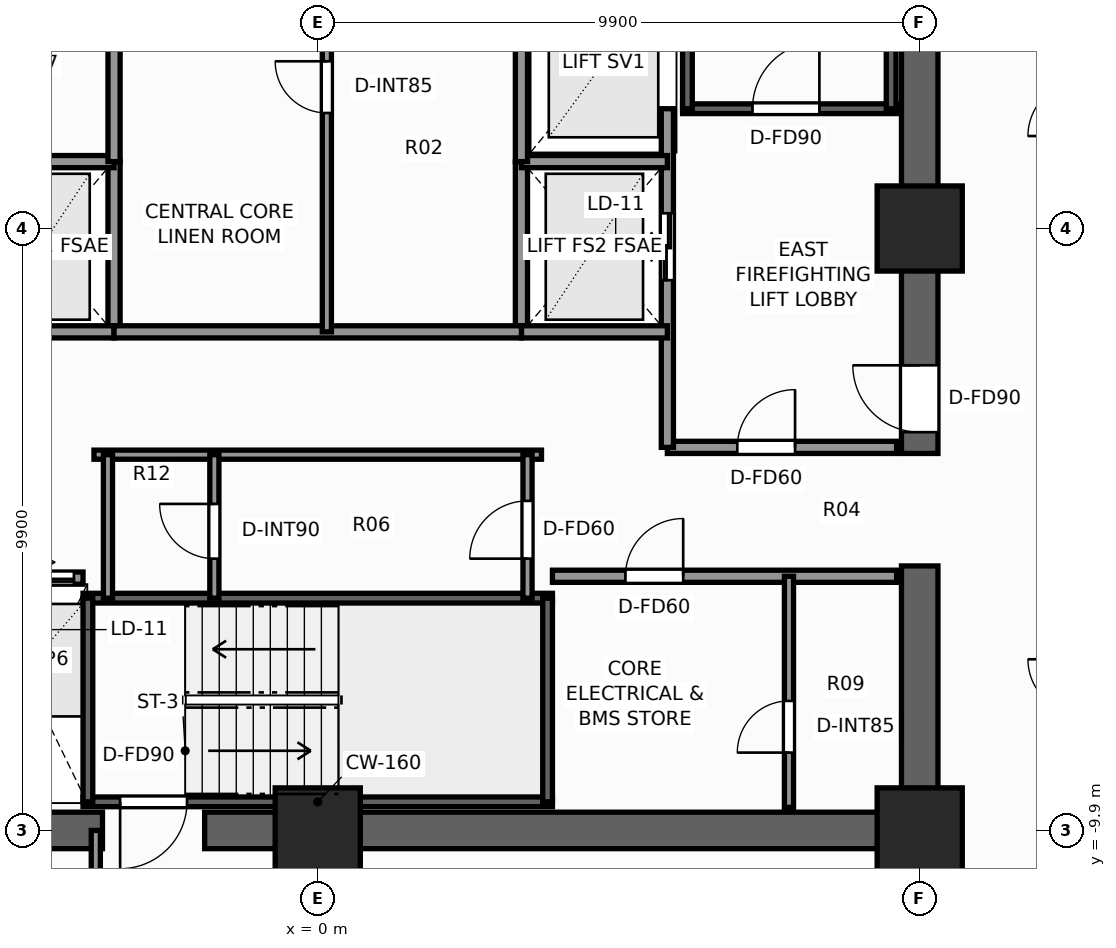
"""IFC4 building model, lengths in metres.
Left out: names, types, materials, properties, quantities, classifications, styles, units other than length and angle.
Written with IfcOpenShell. Run it as: python <this file> out.ifc"""

import sys

from ifc_helpers import new_model, si_unit, direction, frame, frame_2d, origin, origin_2d, place, context, subcontext, project, spatial, rectangle, extrude, element, fill, save


model = new_model("IFC4")
c1 = context("Model", 3, precision=1e-05, world=origin(), true_north=direction((0.0, 1.0)))
c2 = subcontext(c1, "Body", "Model", "MODEL_VIEW")
j1 = project(units=[si_unit("LENGTHUNIT", "METRE"), si_unit("PLANEANGLEUNIT", "RADIAN")], contexts=[c1])
p1 = place(None, origin())
s1 = spatial("IfcSite", under=j1, at=p1, CompositionType="ELEMENT")
p2 = place(p1, origin())
s2 = spatial("IfcBuilding", under=s1, at=p2, CompositionType="ELEMENT")
p3 = place(p2, frame((0.0, 0.0, 72.2)))
s3 = spatial("IfcBuildingStorey", under=s2, at=p3, CompositionType="ELEMENT", Elevation=72.2)
p4 = place(p3, frame((10.2, -9.9, 0.0), z_axis=(0.0, 0.0, 1.0), x_axis=(-1.0, 0.0, 0.0)))
e1 = element("IfcWall", 1, at=p4, inside=s3, PredefinedType="SHEAR", context=c2, shape_type="SweptSolid", body=[
    extrude(rectangle(XDim=12.06, YDim=0.6, at=frame_2d((6.03, 0.0))), origin(), (0.0, 0.0, 1.0), 3.3),
])
p5 = place(p3, frame((-3.54, -9.9, 0.0), z_axis=(0.0, 0.0, 1.0), x_axis=(-1.0, 0.0, 0.0)))
e2 = element("IfcWall", 2, at=p5, inside=s3, PredefinedType="SHEAR", context=c2, shape_type="SweptSolid", body=[
    extrude(rectangle(XDim=6.66, YDim=0.6, at=frame_2d((3.33, 0.0))), origin(), (0.0, 0.0, 1.0), 3.3),
])
p6 = place(p3, frame((9.9, -9.6, 0.0), z_axis=(0.0, 0.0, 1.0), x_axis=(0.0, 1.0, 0.0)))
e3 = element("IfcWall", 3, at=p6, inside=s3, PredefinedType="SHEAR", context=c2, shape_type="SweptSolid", body=[
    extrude(rectangle(XDim=4.05, YDim=0.6, at=frame_2d((2.025, 0.0))), origin(), (0.0, 0.0, 1.0), 3.3),
])
p7 = place(p3, frame((9.9, -3.7, 0.0), z_axis=(0.0, 0.0, 1.0), x_axis=(0.0, 1.0, 0.0)))
e4 = element("IfcWall", 4, at=p7, inside=s3, PredefinedType="SHEAR", context=c2, shape_type="SweptSolid", body=[
    extrude(rectangle(XDim=13.3, YDim=0.6, at=frame_2d((6.65, 0.0))), origin(), (0.0, 0.0, 1.0), 3.3),
])
p8 = place(p7, frame((0.35, 0.0, 0.0)))
e5 = element("IfcOpeningElement", 5, at=p8, cuts=e4, PredefinedType="OPENING", context=c2, shape_type="SweptSolid", body=[
    extrude(rectangle(XDim=1.1, YDim=2.2, at=frame_2d((0.55, 1.1))), frame((0.0, 0.31, 0.0), z_axis=(0.0, -1.0, 0.0), x_axis=(1.0, 0.0, 0.0)), (0.0, 0.0, 1.0), 0.62),
])
for number, where, z_axis, x_axis in (
    (6, (9.9, -9.9, 0.0), (0.0, 0.0, 1.0), (1.0, 0.0, 0.0)),
    (7, (0.0, -9.9, 0.0), (0.0, 0.0, 1.0), (1.0, 0.0, 0.0)),
    (8, (9.9, 0.0, 0.0), (0.0, 0.0, 1.0), (1.0, 0.0, 0.0)),
):
    element("IfcColumn", number, at=place(p3, frame(where, z_axis=z_axis, x_axis=x_axis)), inside=s3, PredefinedType="COLUMN", context=c2, shape_type="SweptSolid", body=[
        extrude(rectangle(XDim=1.4, YDim=1.4, at=origin_2d()), origin(), (0.0, 0.0, 1.0), 3.3),
    ])
p9 = place(p3, frame((6.0, 1.97, 0.0), z_axis=(0.0, 0.0, 1.0), x_axis=(1.0, 0.0, 0.0)))
e9 = element("IfcWall", 9, at=p9, inside=s3, PredefinedType="SHEAR", context=c2, shape_type="SweptSolid", body=[
    extrude(rectangle(XDim=3.52, YDim=0.16, at=frame_2d((1.76, 0.0))), origin(), (0.0, 0.0, 1.0), 3.3),
])
p10 = place(p9, frame((1.15, 0.0, 0.0)))
e10 = element("IfcOpeningElement", 10, at=p10, cuts=e9, PredefinedType="OPENING", context=c2, shape_type="SweptSolid", body=[
    extrude(rectangle(XDim=1.1, YDim=2.2, at=frame_2d((0.55, 1.1))), frame((0.0, 0.09, 0.0), z_axis=(0.0, -1.0, 0.0), x_axis=(1.0, 0.0, 0.0)), (0.0, 0.0, 1.0), 0.18),
])
for number, where, z_axis, x_axis in (
    (11, (6.08, 1.97, 0.0), (0.0, 0.0, 1.0), (0.0, 1.0, 0.0)),
    (12, (9.43, 1.97, 0.0), (0.0, 0.0, 1.0), (0.0, 1.0, 0.0)),
):
    element("IfcWall", number, at=place(p3, frame(where, z_axis=z_axis, x_axis=x_axis)), inside=s3, PredefinedType="SHEAR", context=c2, shape_type="SweptSolid", body=[
        extrude(rectangle(XDim=7.56, YDim=0.16, at=frame_2d((3.78, 0.0))), origin(), (0.0, 0.0, 1.0), 3.3),
    ])
p11 = place(p3, frame((3.86, -9.43, 0.0), z_axis=(0.0, 0.0, 1.0), x_axis=(-1.0, 0.0, 0.0)))
e13 = element("IfcWall", 13, at=p11, inside=s3, PredefinedType="SHEAR", context=c2, shape_type="SweptSolid", body=[
    extrude(rectangle(XDim=7.72, YDim=0.16, at=frame_2d((3.86, 0.0))), origin(), (0.0, 0.0, 1.0), 3.3),
])
p12 = place(p11, frame((6.01, 0.0, 0.0)))
e14 = element("IfcOpeningElement", 14, at=p12, cuts=e13, PredefinedType="OPENING", context=c2, shape_type="SweptSolid", body=[
    extrude(rectangle(XDim=1.1, YDim=2.2, at=frame_2d((0.55, 1.1))), frame((0.0, 0.09, 0.0), z_axis=(0.0, -1.0, 0.0), x_axis=(1.0, 0.0, 0.0)), (0.0, 0.0, 1.0), 0.18),
])
p13 = place(p3, frame((-3.86, -6.08, 0.0), z_axis=(0.0, 0.0, 1.0), x_axis=(1.0, 0.0, 0.0)))
e15 = element("IfcWall", 15, at=p13, inside=s3, PredefinedType="SHEAR", context=c2, shape_type="SweptSolid", body=[
    extrude(rectangle(XDim=7.72, YDim=0.16, at=frame_2d((3.86, 0.0))), origin(), (0.0, 0.0, 1.0), 3.3),
])
for number, where, z_axis, x_axis in (
    (16, (-3.78, -9.43, 0.0), (0.0, 0.0, 1.0), (0.0, 1.0, 0.0)),
    (17, (3.78, -9.43, 0.0), (0.0, 0.0, 1.0), (0.0, 1.0, 0.0)),
):
    element("IfcWall", number, at=place(p3, frame(where, z_axis=z_axis, x_axis=x_axis)), inside=s3, PredefinedType="SHEAR", context=c2, shape_type="SweptSolid", body=[
        extrude(rectangle(XDim=3.35, YDim=0.16, at=frame_2d((1.675, 0.0))), origin(), (0.0, 0.0, 1.0), 3.3),
    ])
p14 = place(p3, frame((-3.35, -1.7, 0.0), z_axis=(0.0, 0.0, 1.0), x_axis=(0.0, 1.0, 0.0)))
e18 = element("IfcWall", 18, at=p14, inside=s3, PredefinedType="SOLIDWALL", context=c2, shape_type="SweptSolid", body=[
    extrude(rectangle(XDim=2.8, YDim=0.2, at=frame_2d((1.4, 0.0))), origin(), (0.0, 0.0, 1.0), 3.08),
])
for number, where, z_axis, x_axis in (
    (19, (-5.75, -1.7, 0.0), (0.0, 0.0, 1.0), (1.0, 0.0, 0.0)),
    (20, (-5.75, 1.1, 0.0), (0.0, 0.0, 1.0), (1.0, 0.0, 0.0)),
):
    element("IfcWall", number, at=place(p3, frame(where, z_axis=z_axis, x_axis=x_axis)), inside=s3, PredefinedType="SOLIDWALL", context=c2, shape_type="SweptSolid", body=[
        extrude(rectangle(XDim=2.4, YDim=0.2, at=frame_2d((1.2, 0.0))), origin(), (0.0, 0.0, 1.0), 3.08),
    ])
p15 = place(p3, frame((5.75, -3.6, 0.0), z_axis=(0.0, 0.0, 1.0), x_axis=(1.0, 0.0, 0.0)))
e21 = element("IfcWall", 21, at=p15, inside=s3, PredefinedType="SOLIDWALL", context=c2, shape_type="SweptSolid", body=[
    extrude(rectangle(XDim=3.77, YDim=0.2, at=frame_2d((1.885, 0.0))), origin(), (0.0, 0.0, 1.0), 3.08),
])
p16 = place(p15, frame((1.15, 0.0, 0.0)))
e22 = element("IfcOpeningElement", 22, at=p16, cuts=e21, PredefinedType="OPENING", context=c2, shape_type="SweptSolid", body=[
    extrude(rectangle(XDim=0.95, YDim=2.06, at=frame_2d((0.475, 1.03))), frame((0.0, 0.11, 0.0), z_axis=(0.0, -1.0, 0.0), x_axis=(1.0, 0.0, 0.0)), (0.0, 0.0, 1.0), 0.22),
])
p17 = place(p3, frame((5.75, -3.6, 0.0), z_axis=(0.0, 0.0, 1.0), x_axis=(0.0, 1.0, 0.0)))
e23 = element("IfcWall", 23, at=p17, inside=s3, PredefinedType="SOLIDWALL", context=c2, shape_type="SweptSolid", body=[
    extrude(rectangle(XDim=5.57, YDim=0.2, at=frame_2d((2.785, 0.0))), origin(), (0.0, 0.0, 1.0), 3.08),
])
p18 = place(p17, frame((2.75, 0.0, 0.0)))
e24 = element("IfcOpeningElement", 24, at=p18, cuts=e23, PredefinedType="OPENING", context=c2, shape_type="SweptSolid", body=[
    extrude(rectangle(XDim=1.1, YDim=2.2, at=frame_2d((0.55, 1.1))), frame((0.0, 0.11, 0.0), z_axis=(0.0, -1.0, 0.0), x_axis=(1.0, 0.0, 0.0)), (0.0, 0.0, 1.0), 0.22),
])
p19 = place(p3, frame((3.35, -1.7, 0.0), z_axis=(0.0, 0.0, 1.0), x_axis=(0.0, 1.0, 0.0)))
e25 = element("IfcWall", 25, at=p19, inside=s3, PredefinedType="SOLIDWALL", context=c2, shape_type="SweptSolid", body=[
    extrude(rectangle(XDim=2.8, YDim=0.2, at=frame_2d((1.4, 0.0))), origin(), (0.0, 0.0, 1.0), 3.08),
])
for number, where, z_axis, x_axis in (
    (26, (3.35, -1.7, 0.0), (0.0, 0.0, 1.0), (1.0, 0.0, 0.0)),
    (27, (3.35, 1.1, 0.0), (0.0, 0.0, 1.0), (1.0, 0.0, 0.0)),
):
    element("IfcWall", number, at=place(p3, frame(where, z_axis=z_axis, x_axis=x_axis)), inside=s3, PredefinedType="SOLIDWALL", context=c2, shape_type="SweptSolid", body=[
        extrude(rectangle(XDim=2.4, YDim=0.2, at=frame_2d((1.2, 0.0))), origin(), (0.0, 0.0, 1.0), 3.08),
    ])
p20 = place(p3, frame((-9.52, -5.75, 0.0), z_axis=(0.0, 0.0, 1.0), x_axis=(1.0, 0.0, 0.0)))
e28 = element("IfcWall", 28, at=p20, inside=s3, PredefinedType="SOLIDWALL", context=c2, shape_type="SweptSolid", body=[
    extrude(rectangle(XDim=5.66, YDim=0.2, at=frame_2d((2.83, 0.0))), origin(), (0.0, 0.0, 1.0), 3.08),
])
p21 = place(p20, frame((0.55, 0.0, 0.0)))
e29 = element("IfcOpeningElement", 29, at=p21, cuts=e28, PredefinedType="OPENING", context=c2, shape_type="SweptSolid", body=[
    extrude(rectangle(XDim=1.1, YDim=2.2, at=frame_2d((0.55, 1.1))), frame((0.0, 0.11, 0.0), z_axis=(0.0, -1.0, 0.0), x_axis=(1.0, 0.0, 0.0)), (0.0, 0.0, 1.0), 0.22),
])
p22 = place(p20, frame((2.48, 0.0, 0.0)))
e30 = element("IfcOpeningElement", 30, at=p22, cuts=e28, PredefinedType="OPENING", context=c2, shape_type="SweptSolid", body=[
    extrude(rectangle(XDim=1.1, YDim=2.2, at=frame_2d((0.55, 1.1))), frame((0.0, 0.11, 0.0), z_axis=(0.0, -1.0, 0.0), x_axis=(1.0, 0.0, 0.0)), (0.0, 0.0, 1.0), 0.22),
])
p23 = place(p20, frame((4.41, 0.0, 0.0)))
e31 = element("IfcOpeningElement", 31, at=p23, cuts=e28, PredefinedType="OPENING", context=c2, shape_type="SweptSolid", body=[
    extrude(rectangle(XDim=1.1, YDim=2.2, at=frame_2d((0.55, 1.1))), frame((0.0, 0.11, 0.0), z_axis=(0.0, -1.0, 0.0), x_axis=(1.0, 0.0, 0.0)), (0.0, 0.0, 1.0), 0.22),
])
p24 = place(p3, frame((3.86, -5.72, 0.0), z_axis=(0.0, 0.0, 1.0), x_axis=(1.0, 0.0, 0.0)))
e32 = element("IfcWall", 32, at=p24, inside=s3, PredefinedType="SOLIDWALL", context=c2, shape_type="SweptSolid", body=[
    extrude(rectangle(XDim=5.66, YDim=0.2, at=frame_2d((2.83, 0.0))), origin(), (0.0, 0.0, 1.0), 3.08),
])
p25 = place(p24, frame((1.2, 0.0, 0.0)))
e33 = element("IfcOpeningElement", 33, at=p25, cuts=e32, PredefinedType="OPENING", context=c2, shape_type="SweptSolid", body=[
    extrude(rectangle(XDim=0.95, YDim=2.06, at=frame_2d((0.475, 1.03))), frame((0.0, 0.11, 0.0), z_axis=(0.0, -1.0, 0.0), x_axis=(1.0, 0.0, 0.0)), (0.0, 0.0, 1.0), 0.22),
])
p26 = place(p3, frame((7.75, -9.52, 0.0), z_axis=(0.0, 0.0, 1.0), x_axis=(0.0, 1.0, 0.0)))
e34 = element("IfcWall", 34, at=p26, inside=s3, PredefinedType="PARTITIONING", context=c2, shape_type="SweptSolid", body=[
    extrude(rectangle(XDim=3.8, YDim=0.15, at=frame_2d((1.9, 0.0))), origin(), (0.0, 0.0, 1.0), 3.08),
])
p27 = place(p26, frame((0.9, 0.0, 0.0)))
e35 = element("IfcOpeningElement", 35, at=p27, cuts=e34, PredefinedType="OPENING", context=c2, shape_type="SweptSolid", body=[
    extrude(rectangle(XDim=0.85, YDim=2.03, at=frame_2d((0.425, 1.015))), frame((0.0, 0.085, 0.0), z_axis=(0.0, -1.0, 0.0), x_axis=(1.0, 0.0, 0.0)), (0.0, 0.0, 1.0), 0.17),
])
p28 = place(p3, frame((-3.35, -1.7, 0.0), z_axis=(0.0, 0.0, 1.0), x_axis=(1.0, 0.0, 0.0)))
e36 = element("IfcWall", 36, at=p28, inside=s3, PredefinedType="SOLIDWALL", context=c2, shape_type="SweptSolid", body=[
    extrude(rectangle(XDim=6.7, YDim=0.2, at=frame_2d((3.35, 0.0))), origin(), (0.0, 0.0, 1.0), 3.08),
])
for number, where, z_axis, x_axis in (
    (37, (-3.35, 1.1, 0.0), (0.0, 0.0, 1.0), (0.0, 1.0, 0.0)),
    (38, (3.35, 1.1, 0.0), (0.0, 0.0, 1.0), (0.0, 1.0, 0.0)),
):
    element("IfcWall", number, at=place(p3, frame(where, z_axis=z_axis, x_axis=x_axis)), inside=s3, PredefinedType="SOLIDWALL", context=c2, shape_type="SweptSolid", body=[
        extrude(rectangle(XDim=3.2, YDim=0.2, at=frame_2d((1.6, 0.0))), origin(), (0.0, 0.0, 1.0), 3.08),
    ])
p29 = place(p3, frame((0.15, -1.7, 0.0), z_axis=(0.0, 0.0, 1.0), x_axis=(0.0, 1.0, 0.0)))
e39 = element("IfcWall", 39, at=p29, inside=s3, PredefinedType="PARTITIONING", context=c2, shape_type="SweptSolid", body=[
    extrude(rectangle(XDim=6.0, YDim=0.15, at=frame_2d((3.0, 0.0))), origin(), (0.0, 0.0, 1.0), 3.08),
])
p30 = place(p29, frame((3.6, 0.0, 0.0)))
e40 = element("IfcOpeningElement", 40, at=p30, cuts=e39, PredefinedType="OPENING", context=c2, shape_type="SweptSolid", body=[
    extrude(rectangle(XDim=0.85, YDim=2.03, at=frame_2d((0.425, 1.015))), frame((0.0, 0.085, 0.0), z_axis=(0.0, -1.0, 0.0), x_axis=(1.0, 0.0, 0.0)), (0.0, 0.0, 1.0), 0.17),
])
p31 = place(p3, frame((-3.68, -3.72, 0.0), z_axis=(0.0, 0.0, 1.0), x_axis=(1.0, 0.0, 0.0)))
e41 = element("IfcWall", 41, at=p31, inside=s3, PredefinedType="PARTITIONING", context=c2, shape_type="SweptSolid", body=[
    extrude(rectangle(XDim=7.36, YDim=0.15, at=frame_2d((3.68, 0.0))), origin(), (0.0, 0.0, 1.0), 3.08),
])
p32 = place(p3, frame((3.45, -6.08, 0.0), z_axis=(0.0, 0.0, 1.0), x_axis=(0.0, 1.0, 0.0)))
e42 = element("IfcWall", 42, at=p32, inside=s3, PredefinedType="PARTITIONING", context=c2, shape_type="SweptSolid", body=[
    extrude(rectangle(XDim=2.36, YDim=0.15, at=frame_2d((1.18, 0.0))), origin(), (0.0, 0.0, 1.0), 3.08),
])
p33 = place(p32, frame((0.65, 0.0, 0.0)))
e43 = element("IfcOpeningElement", 43, at=p33, cuts=e42, PredefinedType="OPENING", context=c2, shape_type="SweptSolid", body=[
    extrude(rectangle(XDim=0.95, YDim=2.06, at=frame_2d((0.475, 1.03))), frame((0.0, 0.085, 0.0), z_axis=(0.0, -1.0, 0.0), x_axis=(1.0, 0.0, 0.0)), (0.0, 0.0, 1.0), 0.17),
])
p34 = place(p3, frame((-3.45, -6.08, 0.0), z_axis=(0.0, 0.0, 1.0), x_axis=(0.0, 1.0, 0.0)))
e44 = element("IfcWall", 44, at=p34, inside=s3, PredefinedType="PARTITIONING", context=c2, shape_type="SweptSolid", body=[
    extrude(rectangle(XDim=2.36, YDim=0.15, at=frame_2d((1.18, 0.0))), origin(), (0.0, 0.0, 1.0), 3.08),
])
p35 = place(p3, frame((-1.7, -6.08, 0.0), z_axis=(0.0, 0.0, 1.0), x_axis=(0.0, 1.0, 0.0)))
e45 = element("IfcWall", 45, at=p35, inside=s3, PredefinedType="PARTITIONING", context=c2, shape_type="SweptSolid", body=[
    extrude(rectangle(XDim=2.36, YDim=0.15, at=frame_2d((1.18, 0.0))), origin(), (0.0, 0.0, 1.0), 3.08),
])
p36 = place(p35, frame((0.65, 0.0, 0.0)))
e46 = element("IfcOpeningElement", 46, at=p36, cuts=e45, PredefinedType="OPENING", context=c2, shape_type="SweptSolid", body=[
    extrude(rectangle(XDim=0.9, YDim=2.06, at=frame_2d((0.45, 1.03))), frame((0.0, 0.085, 0.0), z_axis=(0.0, -1.0, 0.0), x_axis=(1.0, 0.0, 0.0)), (0.0, 0.0, 1.0), 0.17),
])
p37 = place(p3, frame((-3.65, -12.42, 0.0), z_axis=(0.0, 0.0, 1.0), x_axis=(0.0, 1.0, 0.0)))
e47 = element("IfcWall", 47, at=p37, inside=s3, PredefinedType="PARTITIONING", context=c2, shape_type="SweptSolid", body=[
    extrude(rectangle(XDim=2.52, YDim=0.15, at=frame_2d((1.26, 0.0))), origin(), (0.0, 0.0, 1.0), 3.08),
])
p38 = place(p10, origin())
e48 = element("IfcDoor", 48, at=p38, inside=s3, OperationType="SINGLE_SWING_RIGHT", PredefinedType="DOOR", context=c2, shape_type="SweptSolid", body=[
    extrude(rectangle(XDim=1.1, YDim=2.2, at=frame_2d((0.55, 1.1))), frame((0.0, 0.025, 0.0), z_axis=(0.0, -1.0, 0.0), x_axis=(1.0, 0.0, 0.0)), (0.0, 0.0, 1.0), 0.05),
])
fill(e10, e48)
p39 = place(p12, origin())
e49 = element("IfcDoor", 49, at=p39, inside=s3, OperationType="SINGLE_SWING_RIGHT", PredefinedType="DOOR", context=c2, shape_type="SweptSolid", body=[
    extrude(rectangle(XDim=1.1, YDim=2.2, at=frame_2d((0.55, 1.1))), frame((0.0, 0.025, 0.0), z_axis=(0.0, -1.0, 0.0), x_axis=(1.0, 0.0, 0.0)), (0.0, 0.0, 1.0), 0.05),
])
fill(e14, e49)
p40 = place(p8, origin())
e50 = element("IfcDoor", 50, at=p40, inside=s3, OperationType="SINGLE_SWING_RIGHT", PredefinedType="DOOR", context=c2, shape_type="SweptSolid", body=[
    extrude(rectangle(XDim=1.1, YDim=2.2, at=frame_2d((0.55, 1.1))), frame((0.0, 0.025, 0.0), z_axis=(0.0, -1.0, 0.0), x_axis=(1.0, 0.0, 0.0)), (0.0, 0.0, 1.0), 0.05),
])
fill(e5, e50)
p41 = place(p18, origin())
e51 = element("IfcDoor", 51, at=p41, inside=s3, OperationType="DOUBLE_DOOR_SLIDING", PredefinedType="DOOR", context=c2, shape_type="SweptSolid", body=[
    extrude(rectangle(XDim=1.1, YDim=2.2, at=frame_2d((0.55, 1.1))), frame((0.0, 0.025, 0.0), z_axis=(0.0, -1.0, 0.0), x_axis=(1.0, 0.0, 0.0)), (0.0, 0.0, 1.0), 0.05),
])
fill(e24, e51)
p42 = place(p23, origin())
e52 = element("IfcDoor", 52, at=p42, inside=s3, OperationType="DOUBLE_DOOR_SLIDING", PredefinedType="DOOR", context=c2, shape_type="SweptSolid", body=[
    extrude(rectangle(XDim=1.1, YDim=2.2, at=frame_2d((0.55, 1.1))), frame((0.0, 0.025, 0.0), z_axis=(0.0, -1.0, 0.0), x_axis=(1.0, 0.0, 0.0)), (0.0, 0.0, 1.0), 0.05),
])
fill(e31, e52)
p43 = place(p25, origin())
e53 = element("IfcDoor", 53, at=p43, inside=s3, OperationType="SINGLE_SWING_RIGHT", PredefinedType="DOOR", context=c2, shape_type="SweptSolid", body=[
    extrude(rectangle(XDim=0.95, YDim=2.06, at=frame_2d((0.475, 1.03))), frame((0.0, 0.025, 0.0), z_axis=(0.0, -1.0, 0.0), x_axis=(1.0, 0.0, 0.0)), (0.0, 0.0, 1.0), 0.05),
])
fill(e33, e53)
p44 = place(p27, origin())
e54 = element("IfcDoor", 54, at=p44, inside=s3, OperationType="SINGLE_SWING_LEFT", PredefinedType="DOOR", context=c2, shape_type="SweptSolid", body=[
    extrude(rectangle(XDim=0.85, YDim=2.03, at=frame_2d((0.425, 1.015))), frame((0.0, 0.025, 0.0), z_axis=(0.0, -1.0, 0.0), x_axis=(1.0, 0.0, 0.0)), (0.0, 0.0, 1.0), 0.05),
])
fill(e35, e54)
p45 = place(p16, origin())
e55 = element("IfcDoor", 55, at=p45, inside=s3, OperationType="SINGLE_SWING_RIGHT", PredefinedType="DOOR", context=c2, shape_type="SweptSolid", body=[
    extrude(rectangle(XDim=0.95, YDim=2.06, at=frame_2d((0.475, 1.03))), frame((0.0, 0.025, 0.0), z_axis=(0.0, -1.0, 0.0), x_axis=(1.0, 0.0, 0.0)), (0.0, 0.0, 1.0), 0.05),
])
fill(e22, e55)
p46 = place(p30, origin())
e56 = element("IfcDoor", 56, at=p46, inside=s3, OperationType="SINGLE_SWING_RIGHT", PredefinedType="DOOR", context=c2, shape_type="SweptSolid", body=[
    extrude(rectangle(XDim=0.85, YDim=2.03, at=frame_2d((0.425, 1.015))), frame((0.0, 0.025, 0.0), z_axis=(0.0, -1.0, 0.0), x_axis=(1.0, 0.0, 0.0)), (0.0, 0.0, 1.0), 0.05),
])
fill(e40, e56)
p47 = place(p33, origin())
e57 = element("IfcDoor", 57, at=p47, inside=s3, OperationType="SINGLE_SWING_LEFT", PredefinedType="DOOR", context=c2, shape_type="SweptSolid", body=[
    extrude(rectangle(XDim=0.95, YDim=2.06, at=frame_2d((0.475, 1.03))), frame((0.0, 0.025, 0.0), z_axis=(0.0, -1.0, 0.0), x_axis=(1.0, 0.0, 0.0)), (0.0, 0.0, 1.0), 0.05),
])
fill(e43, e57)
p48 = place(p36, origin())
e58 = element("IfcDoor", 58, at=p48, inside=s3, OperationType="SINGLE_SWING_RIGHT", PredefinedType="DOOR", context=c2, shape_type="SweptSolid", body=[
    extrude(rectangle(XDim=0.9, YDim=2.06, at=frame_2d((0.45, 1.03))), frame((0.0, 0.025, 0.0), z_axis=(0.0, -1.0, 0.0), x_axis=(1.0, 0.0, 0.0)), (0.0, 0.0, 1.0), 0.05),
])
fill(e46, e58)
save(model, sys.argv[1])
